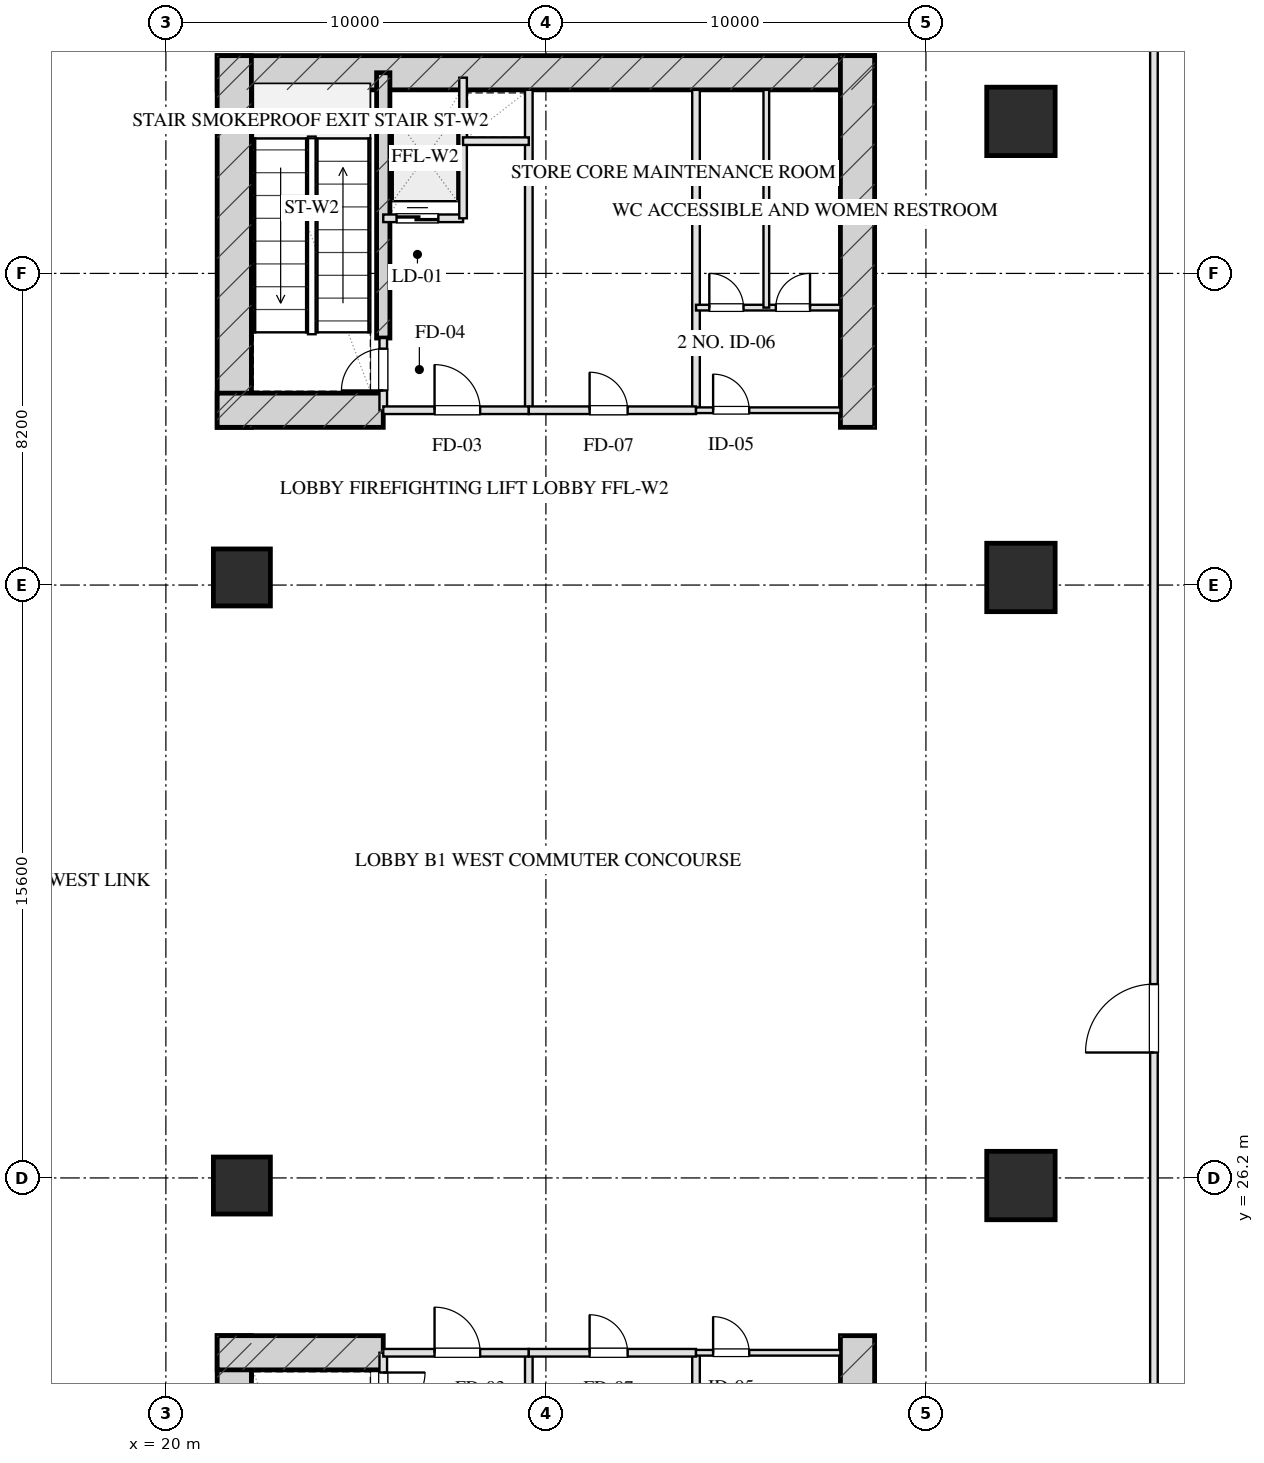
"""IFC4 building model, lengths in metres.
Left out: names, types, materials, properties, quantities, classifications, styles, units other than length and angle.
Written with IfcOpenShell. Run it as: python <this file> out.ifc"""

import sys

from ifc_helpers import new_model, si_unit, direction, frame, frame_2d, origin, origin_2d, place, context, subcontext, project, spatial, rectangle, hollow_rectangle, extrude, element, fill, save


model = new_model("IFC4")
c1 = context("Model", 3, precision=1e-05, world=origin(), true_north=direction((0.0, 1.0)))
c2 = subcontext(c1, "Body", "Model", "MODEL_VIEW")
j1 = project(units=[si_unit("LENGTHUNIT", "METRE"), si_unit("PLANEANGLEUNIT", "RADIAN")], contexts=[c1])
p1 = place(None, origin())
s1 = spatial("IfcSite", under=j1, at=p1, CompositionType="ELEMENT")
p2 = place(p1, origin())
s2 = spatial("IfcBuilding", under=s1, at=p2, CompositionType="ELEMENT")
p3 = place(p2, frame((0.0, 0.0, -6.0)))
s3 = spatial("IfcBuildingStorey", under=s2, at=p3, CompositionType="ELEMENT", Elevation=-6.0)
for number, where, z_axis, x_axis in (
    (1, (21.8, 22.05, 0.0), (0.0, 0.0, 1.0), (0.0, -1.0, 0.0)),
    (2, (38.2, 22.05, 0.0), (0.0, 0.0, 1.0), (0.0, -1.0, 0.0)),
):
    element("IfcWall", number, at=place(p3, frame(where, z_axis=z_axis, x_axis=x_axis)), inside=s3, PredefinedType="SHEAR", context=c2, shape_type="SweptSolid", body=[
        extrude(rectangle(XDim=9.78, YDim=0.9, at=frame_2d((4.89, 0.0))), origin(), (0.0, 0.0, 1.0), 6.0),
    ])
p4 = place(p3, frame((21.35, 21.6, 0.0), z_axis=(0.0, 0.0, 1.0), x_axis=(1.0, 0.0, 0.0)))
e3 = element("IfcWall", 3, at=p4, inside=s3, PredefinedType="SHEAR", context=c2, shape_type="SweptSolid", body=[
    extrude(rectangle(XDim=4.37, YDim=0.9, at=frame_2d((2.185, 0.0))), origin(), (0.0, 0.0, 1.0), 6.0),
])
p5 = place(p3, frame((21.35, 55.28, 0.0), z_axis=(0.0, 0.0, 1.0), x_axis=(1.0, 0.0, 0.0)))
e4 = element("IfcWall", 4, at=p5, inside=s3, PredefinedType="SHEAR", context=c2, shape_type="SweptSolid", body=[
    extrude(rectangle(XDim=17.3, YDim=0.9, at=frame_2d((8.65, 0.0))), origin(), (0.0, 0.0, 1.0), 6.0),
])
for number, where, z_axis, x_axis in (
    (5, (21.8, 45.95, 0.0), (0.0, 0.0, 1.0), (0.0, 1.0, 0.0)),
    (6, (38.2, 45.95, 0.0), (0.0, 0.0, 1.0), (0.0, 1.0, 0.0)),
):
    element("IfcWall", number, at=place(p3, frame(where, z_axis=z_axis, x_axis=x_axis)), inside=s3, PredefinedType="SHEAR", context=c2, shape_type="SweptSolid", body=[
        extrude(rectangle(XDim=9.78, YDim=0.9, at=frame_2d((4.89, 0.0))), origin(), (0.0, 0.0, 1.0), 6.0),
    ])
p6 = place(p3, frame((25.72, 48.3, 0.0), z_axis=(0.0, 0.0, 1.0), x_axis=(0.0, 1.0, 0.0)))
e7 = element("IfcWall", 7, at=p6, inside=s3, PredefinedType="SHEAR", context=c2, shape_type="SweptSolid", body=[
    extrude(rectangle(XDim=6.98, YDim=0.35, at=frame_2d((3.49, 0.0))), origin(), (0.0, 0.0, 1.0), 6.0),
])
p7 = place(p3, frame((21.35, 46.4, 0.0), z_axis=(0.0, 0.0, 1.0), x_axis=(1.0, 0.0, 0.0)))
e8 = element("IfcWall", 8, at=p7, inside=s3, PredefinedType="SHEAR", context=c2, shape_type="SweptSolid", body=[
    extrude(rectangle(XDim=4.37, YDim=0.9, at=frame_2d((2.185, 0.0))), origin(), (0.0, 0.0, 1.0), 6.0),
])
for number, where, z_axis, x_axis in (
    (9, (22.0, 26.0, 0.0), (0.0, 0.0, 1.0), (1.0, 0.0, 0.0)),
    (10, (22.0, 42.0, 0.0), (0.0, 0.0, 1.0), (1.0, 0.0, 0.0)),
):
    element("IfcColumn", number, at=place(p3, frame(where, z_axis=z_axis, x_axis=x_axis)), inside=s3, PredefinedType="COLUMN", context=c2, shape_type="SweptSolid", body=[
        extrude(rectangle(XDim=1.5, YDim=1.5, at=origin_2d()), origin(), (0.0, 0.0, 1.0), 6.001),
    ])
for number, where, z_axis, x_axis in (
    (11, (42.5, 26.0, 0.0), (0.0, 0.0, 1.0), (1.0, 0.0, 0.0)),
    (12, (42.5, 42.0, 0.0), (0.0, 0.0, 1.0), (1.0, 0.0, 0.0)),
    (13, (42.5, 54.0, 0.0), (0.0, 0.0, 1.0), (1.0, 0.0, 0.0)),
):
    element("IfcColumn", number, at=place(p3, frame(where, z_axis=z_axis, x_axis=x_axis)), inside=s3, PredefinedType="COLUMN", context=c2, shape_type="SweptSolid", body=[
        extrude(hollow_rectangle(XDim=1.8, YDim=1.8, WallThickness=0.06, at=origin_2d()), origin(), (0.0, 0.0, 1.0), 6.001),
    ])
p8 = place(p3, frame((25.72, 21.6, 0.0), z_axis=(0.0, 0.0, 1.0), x_axis=(0.0, -1.0, 0.0)))
e14 = element("IfcWall", 14, at=p8, inside=s3, PredefinedType="PARTITIONING", context=c2, shape_type="SweptSolid", body=[
    extrude(rectangle(XDim=1.9, YDim=0.2, at=frame_2d((0.95, 0.0))), origin(), (0.0, 0.0, 1.0), 5.685),
])
p9 = place(p8, frame((0.52, 0.0, 0.0)))
e15 = element("IfcOpeningElement", 15, at=p9, cuts=e14, PredefinedType="OPENING", context=c2, shape_type="SweptSolid", body=[
    extrude(rectangle(XDim=1.1, YDim=2.05, at=frame_2d((0.55, 1.025))), frame((0.0, 0.11, 0.0), z_axis=(0.0, -1.0, 0.0), x_axis=(1.0, 0.0, 0.0)), (0.0, 0.0, 1.0), 0.22),
])
p10 = place(p3, frame((29.55, 21.6, 0.0), z_axis=(0.0, 0.0, 1.0), x_axis=(0.0, -1.0, 0.0)))
e16 = element("IfcWall", 16, at=p10, inside=s3, PredefinedType="PARTITIONING", context=c2, shape_type="SweptSolid", body=[
    extrude(rectangle(XDim=8.43, YDim=0.2, at=frame_2d((4.215, 0.0))), origin(), (0.0, 0.0, 1.0), 5.685),
])
p11 = place(p3, frame((25.72, 21.6, 0.0), z_axis=(0.0, 0.0, 1.0), x_axis=(1.0, 0.0, 0.0)))
e17 = element("IfcWall", 17, at=p11, inside=s3, PredefinedType="PARTITIONING", context=c2, shape_type="SweptSolid", body=[
    extrude(rectangle(XDim=3.83, YDim=0.2, at=frame_2d((1.915, 0.0))), origin(), (0.0, 0.0, 1.0), 5.685),
])
p12 = place(p11, frame((1.35, 0.0, 0.0)))
e18 = element("IfcOpeningElement", 18, at=p12, cuts=e17, PredefinedType="OPENING", context=c2, shape_type="SweptSolid", body=[
    extrude(rectangle(XDim=1.2, YDim=2.05, at=frame_2d((0.6, 1.025))), frame((0.0, 0.11, 0.0), z_axis=(0.0, -1.0, 0.0), x_axis=(1.0, 0.0, 0.0)), (0.0, 0.0, 1.0), 0.22),
])
p13 = place(p3, frame((33.95, 21.6, 0.0), z_axis=(0.0, 0.0, 1.0), x_axis=(0.0, -1.0, 0.0)))
e19 = element("IfcWall", 19, at=p13, inside=s3, PredefinedType="PARTITIONING", context=c2, shape_type="SweptSolid", body=[
    extrude(rectangle(XDim=8.43, YDim=0.2, at=frame_2d((4.215, 0.0))), origin(), (0.0, 0.0, 1.0), 5.685),
])
p14 = place(p3, frame((29.55, 21.6, 0.0), z_axis=(0.0, 0.0, 1.0), x_axis=(1.0, 0.0, 0.0)))
e20 = element("IfcWall", 20, at=p14, inside=s3, PredefinedType="PARTITIONING", context=c2, shape_type="SweptSolid", body=[
    extrude(rectangle(XDim=4.4, YDim=0.2, at=frame_2d((2.2, 0.0))), origin(), (0.0, 0.0, 1.0), 5.685),
])
p15 = place(p14, frame((1.6, 0.0, 0.0)))
e21 = element("IfcOpeningElement", 21, at=p15, cuts=e20, PredefinedType="OPENING", context=c2, shape_type="SweptSolid", body=[
    extrude(rectangle(XDim=1.0, YDim=2.05, at=frame_2d((0.5, 1.025))), frame((0.0, 0.11, 0.0), z_axis=(0.0, -1.0, 0.0), x_axis=(1.0, 0.0, 0.0)), (0.0, 0.0, 1.0), 0.22),
])
p16 = place(p3, frame((33.95, 21.6, 0.0), z_axis=(0.0, 0.0, 1.0), x_axis=(1.0, 0.0, 0.0)))
e22 = element("IfcWall", 22, at=p16, inside=s3, PredefinedType="PARTITIONING", context=c2, shape_type="SweptSolid", body=[
    extrude(rectangle(XDim=3.8, YDim=0.15, at=frame_2d((1.9, 0.0))), origin(), (0.0, 0.0, 1.0), 5.685),
])
p17 = place(p16, frame((0.45, 0.0, 0.0)))
e23 = element("IfcOpeningElement", 23, at=p17, cuts=e22, PredefinedType="OPENING", context=c2, shape_type="SweptSolid", body=[
    extrude(rectangle(XDim=0.95, YDim=2.05, at=frame_2d((0.475, 1.025))), frame((0.0, 0.085, 0.0), z_axis=(0.0, -1.0, 0.0), x_axis=(1.0, 0.0, 0.0)), (0.0, 0.0, 1.0), 0.17),
])
p18 = place(p3, frame((25.72, 46.4, 0.0), z_axis=(0.0, 0.0, 1.0), x_axis=(0.0, 1.0, 0.0)))
e24 = element("IfcWall", 24, at=p18, inside=s3, PredefinedType="PARTITIONING", context=c2, shape_type="SweptSolid", body=[
    extrude(rectangle(XDim=1.9, YDim=0.2, at=frame_2d((0.95, 0.0))), origin(), (0.0, 0.0, 1.0), 5.685),
])
p19 = place(p18, frame((0.52, 0.0, 0.0)))
e25 = element("IfcOpeningElement", 25, at=p19, cuts=e24, PredefinedType="OPENING", context=c2, shape_type="SweptSolid", body=[
    extrude(rectangle(XDim=1.1, YDim=2.05, at=frame_2d((0.55, 1.025))), frame((0.0, 0.11, 0.0), z_axis=(0.0, -1.0, 0.0), x_axis=(1.0, 0.0, 0.0)), (0.0, 0.0, 1.0), 0.22),
])
p20 = place(p3, frame((29.55, 46.4, 0.0), z_axis=(0.0, 0.0, 1.0), x_axis=(0.0, 1.0, 0.0)))
e26 = element("IfcWall", 26, at=p20, inside=s3, PredefinedType="PARTITIONING", context=c2, shape_type="SweptSolid", body=[
    extrude(rectangle(XDim=8.43, YDim=0.2, at=frame_2d((4.215, 0.0))), origin(), (0.0, 0.0, 1.0), 5.685),
])
p21 = place(p3, frame((25.72, 46.4, 0.0), z_axis=(0.0, 0.0, 1.0), x_axis=(1.0, 0.0, 0.0)))
e27 = element("IfcWall", 27, at=p21, inside=s3, PredefinedType="PARTITIONING", context=c2, shape_type="SweptSolid", body=[
    extrude(rectangle(XDim=3.83, YDim=0.2, at=frame_2d((1.915, 0.0))), origin(), (0.0, 0.0, 1.0), 5.685),
])
p22 = place(p21, frame((1.35, 0.0, 0.0)))
e28 = element("IfcOpeningElement", 28, at=p22, cuts=e27, PredefinedType="OPENING", context=c2, shape_type="SweptSolid", body=[
    extrude(rectangle(XDim=1.2, YDim=2.05, at=frame_2d((0.6, 1.025))), frame((0.0, 0.11, 0.0), z_axis=(0.0, -1.0, 0.0), x_axis=(1.0, 0.0, 0.0)), (0.0, 0.0, 1.0), 0.22),
])
p23 = place(p3, frame((25.72, 51.45, 0.0), z_axis=(0.0, 0.0, 1.0), x_axis=(1.0, 0.0, 0.0)))
e29 = element("IfcWall", 29, at=p23, inside=s3, PredefinedType="PARTITIONING", context=c2, shape_type="SweptSolid", body=[
    extrude(rectangle(XDim=2.1, YDim=0.2, at=frame_2d((1.05, 0.0))), origin(), (0.0, 0.0, 1.0), 5.685),
])
p24 = place(p23, frame((0.35, 0.0, 0.0)))
e30 = element("IfcOpeningElement", 30, at=p24, cuts=e29, PredefinedType="OPENING", context=c2, shape_type="SweptSolid", body=[
    extrude(rectangle(XDim=1.1, YDim=2.05, at=frame_2d((0.55, 1.025))), frame((0.0, 0.11, 0.0), z_axis=(0.0, -1.0, 0.0), x_axis=(1.0, 0.0, 0.0)), (0.0, 0.0, 1.0), 0.22),
])
p25 = place(p3, frame((27.82, 51.45, 0.0), z_axis=(0.0, 0.0, 1.0), x_axis=(0.0, 1.0, 0.0)))
e31 = element("IfcWall", 31, at=p25, inside=s3, PredefinedType="PARTITIONING", context=c2, shape_type="SweptSolid", body=[
    extrude(rectangle(XDim=3.7, YDim=0.2, at=frame_2d((1.85, 0.0))), origin(), (0.0, 0.0, 1.0), 5.685),
])
p26 = place(p3, frame((27.82, 53.48, 0.0), z_axis=(0.0, 0.0, 1.0), x_axis=(1.0, 0.0, 0.0)))
e32 = element("IfcWall", 32, at=p26, inside=s3, PredefinedType="PARTITIONING", context=c2, shape_type="SweptSolid", body=[
    extrude(rectangle(XDim=1.73, YDim=0.2, at=frame_2d((0.865, 0.0))), origin(), (0.0, 0.0, 1.0), 5.685),
])
p27 = place(p3, frame((33.95, 46.4, 0.0), z_axis=(0.0, 0.0, 1.0), x_axis=(0.0, 1.0, 0.0)))
e33 = element("IfcWall", 33, at=p27, inside=s3, PredefinedType="PARTITIONING", context=c2, shape_type="SweptSolid", body=[
    extrude(rectangle(XDim=8.43, YDim=0.2, at=frame_2d((4.215, 0.0))), origin(), (0.0, 0.0, 1.0), 5.685),
])
p28 = place(p3, frame((29.55, 46.4, 0.0), z_axis=(0.0, 0.0, 1.0), x_axis=(1.0, 0.0, 0.0)))
e34 = element("IfcWall", 34, at=p28, inside=s3, PredefinedType="PARTITIONING", context=c2, shape_type="SweptSolid", body=[
    extrude(rectangle(XDim=4.4, YDim=0.2, at=frame_2d((2.2, 0.0))), origin(), (0.0, 0.0, 1.0), 5.685),
])
p29 = place(p28, frame((1.6, 0.0, 0.0)))
e35 = element("IfcOpeningElement", 35, at=p29, cuts=e34, PredefinedType="OPENING", context=c2, shape_type="SweptSolid", body=[
    extrude(rectangle(XDim=1.0, YDim=2.05, at=frame_2d((0.5, 1.025))), frame((0.0, 0.11, 0.0), z_axis=(0.0, -1.0, 0.0), x_axis=(1.0, 0.0, 0.0)), (0.0, 0.0, 1.0), 0.22),
])
p30 = place(p3, frame((33.95, 46.4, 0.0), z_axis=(0.0, 0.0, 1.0), x_axis=(1.0, 0.0, 0.0)))
e36 = element("IfcWall", 36, at=p30, inside=s3, PredefinedType="PARTITIONING", context=c2, shape_type="SweptSolid", body=[
    extrude(rectangle(XDim=3.8, YDim=0.15, at=frame_2d((1.9, 0.0))), origin(), (0.0, 0.0, 1.0), 5.685),
])
p31 = place(p30, frame((0.45, 0.0, 0.0)))
e37 = element("IfcOpeningElement", 37, at=p31, cuts=e36, PredefinedType="OPENING", context=c2, shape_type="SweptSolid", body=[
    extrude(rectangle(XDim=0.95, YDim=2.05, at=frame_2d((0.475, 1.025))), frame((0.0, 0.085, 0.0), z_axis=(0.0, -1.0, 0.0), x_axis=(1.0, 0.0, 0.0)), (0.0, 0.0, 1.0), 0.17),
])
p32 = place(p3, frame((33.95, 49.1, 0.0), z_axis=(0.0, 0.0, 1.0), x_axis=(1.0, 0.0, 0.0)))
e38 = element("IfcWall", 38, at=p32, inside=s3, PredefinedType="PARTITIONING", context=c2, shape_type="SweptSolid", body=[
    extrude(rectangle(XDim=3.8, YDim=0.15, at=frame_2d((1.9, 0.0))), origin(), (0.0, 0.0, 1.0), 5.685),
])
p33 = place(p32, frame((0.35, 0.0, 0.0)))
e39 = element("IfcOpeningElement", 39, at=p33, cuts=e38, PredefinedType="OPENING", context=c2, shape_type="SweptSolid", body=[
    extrude(rectangle(XDim=0.9, YDim=2.05, at=frame_2d((0.45, 1.025))), frame((0.0, 0.085, 0.0), z_axis=(0.0, -1.0, 0.0), x_axis=(1.0, 0.0, 0.0)), (0.0, 0.0, 1.0), 0.17),
])
p34 = place(p32, frame((2.1, 0.0, 0.0)))
e40 = element("IfcOpeningElement", 40, at=p34, cuts=e38, PredefinedType="OPENING", context=c2, shape_type="SweptSolid", body=[
    extrude(rectangle(XDim=0.9, YDim=2.05, at=frame_2d((0.45, 1.025))), frame((0.0, 0.085, 0.0), z_axis=(0.0, -1.0, 0.0), x_axis=(1.0, 0.0, 0.0)), (0.0, 0.0, 1.0), 0.17),
])
p35 = place(p3, frame((35.8, 49.1, 0.0), z_axis=(0.0, 0.0, 1.0), x_axis=(0.0, 1.0, 0.0)))
e41 = element("IfcWall", 41, at=p35, inside=s3, PredefinedType="PARTITIONING", context=c2, shape_type="SweptSolid", body=[
    extrude(rectangle(XDim=5.73, YDim=0.15, at=frame_2d((2.865, 0.0))), origin(), (0.0, 0.0, 1.0), 5.685),
])
p36 = place(p3, frame((46.0, 11.5, 0.0), z_axis=(0.0, 0.0, 1.0), x_axis=(0.0, 1.0, 0.0)))
e42 = element("IfcWall", 42, at=p36, inside=s3, PredefinedType="PARTITIONING", context=c2, shape_type="SweptSolid", body=[
    extrude(rectangle(XDim=45.0, YDim=0.2, at=frame_2d((22.5, 0.0))), origin(), (0.0, 0.0, 1.0), 5.685),
])
p37 = place(p36, frame((18.0, 0.0, 0.0)))
e43 = element("IfcOpeningElement", 43, at=p37, cuts=e42, PredefinedType="OPENING", context=c2, shape_type="SweptSolid", body=[
    extrude(rectangle(XDim=1.8, YDim=2.05, at=frame_2d((0.9, 1.025))), frame((0.0, 0.11, 0.0), z_axis=(0.0, -1.0, 0.0), x_axis=(1.0, 0.0, 0.0)), (0.0, 0.0, 1.0), 0.22),
])
p38 = place(p9, origin())
e44 = element("IfcDoor", 44, at=p38, inside=s3, OperationType="SINGLE_SWING_LEFT", PredefinedType="DOOR", context=c2, shape_type="SweptSolid", body=[
    extrude(rectangle(XDim=1.1, YDim=2.05, at=frame_2d((0.55, 1.025))), frame((0.0, 0.025, 0.0), z_axis=(0.0, -1.0, 0.0), x_axis=(1.0, 0.0, 0.0)), (0.0, 0.0, 1.0), 0.05),
])
fill(e15, e44)
p39 = place(p12, origin())
e45 = element("IfcDoor", 45, at=p39, inside=s3, OperationType="SINGLE_SWING_LEFT", PredefinedType="DOOR", context=c2, shape_type="SweptSolid", body=[
    extrude(rectangle(XDim=1.2, YDim=2.05, at=frame_2d((0.6, 1.025))), frame((0.0, 0.025, 0.0), z_axis=(0.0, -1.0, 0.0), x_axis=(1.0, 0.0, 0.0)), (0.0, 0.0, 1.0), 0.05),
])
fill(e18, e45)
p40 = place(p15, origin())
e46 = element("IfcDoor", 46, at=p40, inside=s3, OperationType="SINGLE_SWING_LEFT", PredefinedType="DOOR", context=c2, shape_type="SweptSolid", body=[
    extrude(rectangle(XDim=1.0, YDim=2.05, at=frame_2d((0.5, 1.025))), frame((0.0, 0.025, 0.0), z_axis=(0.0, -1.0, 0.0), x_axis=(1.0, 0.0, 0.0)), (0.0, 0.0, 1.0), 0.05),
])
fill(e21, e46)
p41 = place(p17, origin())
e47 = element("IfcDoor", 47, at=p41, inside=s3, OperationType="SINGLE_SWING_LEFT", PredefinedType="DOOR", context=c2, shape_type="SweptSolid", body=[
    extrude(rectangle(XDim=0.95, YDim=2.05, at=frame_2d((0.475, 1.025))), frame((0.0, 0.025, 0.0), z_axis=(0.0, -1.0, 0.0), x_axis=(1.0, 0.0, 0.0)), (0.0, 0.0, 1.0), 0.05),
])
fill(e23, e47)
p42 = place(p19, origin())
e48 = element("IfcDoor", 48, at=p42, inside=s3, OperationType="SINGLE_SWING_LEFT", PredefinedType="DOOR", context=c2, shape_type="SweptSolid", body=[
    extrude(rectangle(XDim=1.1, YDim=2.05, at=frame_2d((0.55, 1.025))), frame((0.0, 0.025, 0.0), z_axis=(0.0, -1.0, 0.0), x_axis=(1.0, 0.0, 0.0)), (0.0, 0.0, 1.0), 0.05),
])
fill(e25, e48)
p43 = place(p22, origin())
e49 = element("IfcDoor", 49, at=p43, inside=s3, OperationType="SINGLE_SWING_LEFT", PredefinedType="DOOR", context=c2, shape_type="SweptSolid", body=[
    extrude(rectangle(XDim=1.2, YDim=2.05, at=frame_2d((0.6, 1.025))), frame((0.0, 0.025, 0.0), z_axis=(0.0, -1.0, 0.0), x_axis=(1.0, 0.0, 0.0)), (0.0, 0.0, 1.0), 0.05),
])
fill(e28, e49)
p44 = place(p24, origin())
e50 = element("IfcDoor", 50, at=p44, inside=s3, OperationType="DOUBLE_DOOR_SLIDING", PredefinedType="DOOR", context=c2, shape_type="SweptSolid", body=[
    extrude(rectangle(XDim=1.1, YDim=2.05, at=frame_2d((0.55, 1.025))), frame((0.0, 0.025, 0.0), z_axis=(0.0, -1.0, 0.0), x_axis=(1.0, 0.0, 0.0)), (0.0, 0.0, 1.0), 0.05),
])
fill(e30, e50)
p45 = place(p29, origin())
e51 = element("IfcDoor", 51, at=p45, inside=s3, OperationType="SINGLE_SWING_LEFT", PredefinedType="DOOR", context=c2, shape_type="SweptSolid", body=[
    extrude(rectangle(XDim=1.0, YDim=2.05, at=frame_2d((0.5, 1.025))), frame((0.0, 0.025, 0.0), z_axis=(0.0, -1.0, 0.0), x_axis=(1.0, 0.0, 0.0)), (0.0, 0.0, 1.0), 0.05),
])
fill(e35, e51)
p46 = place(p31, origin())
e52 = element("IfcDoor", 52, at=p46, inside=s3, OperationType="SINGLE_SWING_LEFT", PredefinedType="DOOR", context=c2, shape_type="SweptSolid", body=[
    extrude(rectangle(XDim=0.95, YDim=2.05, at=frame_2d((0.475, 1.025))), frame((0.0, 0.025, 0.0), z_axis=(0.0, -1.0, 0.0), x_axis=(1.0, 0.0, 0.0)), (0.0, 0.0, 1.0), 0.05),
])
fill(e37, e52)
p47 = place(p33, origin())
e53 = element("IfcDoor", 53, at=p47, inside=s3, OperationType="SINGLE_SWING_LEFT", PredefinedType="DOOR", context=c2, shape_type="SweptSolid", body=[
    extrude(rectangle(XDim=0.9, YDim=2.05, at=frame_2d((0.45, 1.025))), frame((0.0, 0.025, 0.0), z_axis=(0.0, -1.0, 0.0), x_axis=(1.0, 0.0, 0.0)), (0.0, 0.0, 1.0), 0.05),
])
fill(e39, e53)
p48 = place(p34, origin())
e54 = element("IfcDoor", 54, at=p48, inside=s3, OperationType="SINGLE_SWING_RIGHT", PredefinedType="DOOR", context=c2, shape_type="SweptSolid", body=[
    extrude(rectangle(XDim=0.9, YDim=2.05, at=frame_2d((0.45, 1.025))), frame((0.0, 0.025, 0.0), z_axis=(0.0, -1.0, 0.0), x_axis=(1.0, 0.0, 0.0)), (0.0, 0.0, 1.0), 0.05),
])
fill(e40, e54)
p49 = place(p37, origin())
e55 = element("IfcDoor", 55, at=p49, inside=s3, OperationType="SINGLE_SWING_LEFT", PredefinedType="DOOR", context=c2, shape_type="SweptSolid", body=[
    extrude(rectangle(XDim=1.8, YDim=2.05, at=frame_2d((0.9, 1.025))), frame((0.0, 0.025, 0.0), z_axis=(0.0, -1.0, 0.0), x_axis=(1.0, 0.0, 0.0)), (0.0, 0.0, 1.0), 0.05),
])
fill(e43, e55)
save(model, sys.argv[1])
